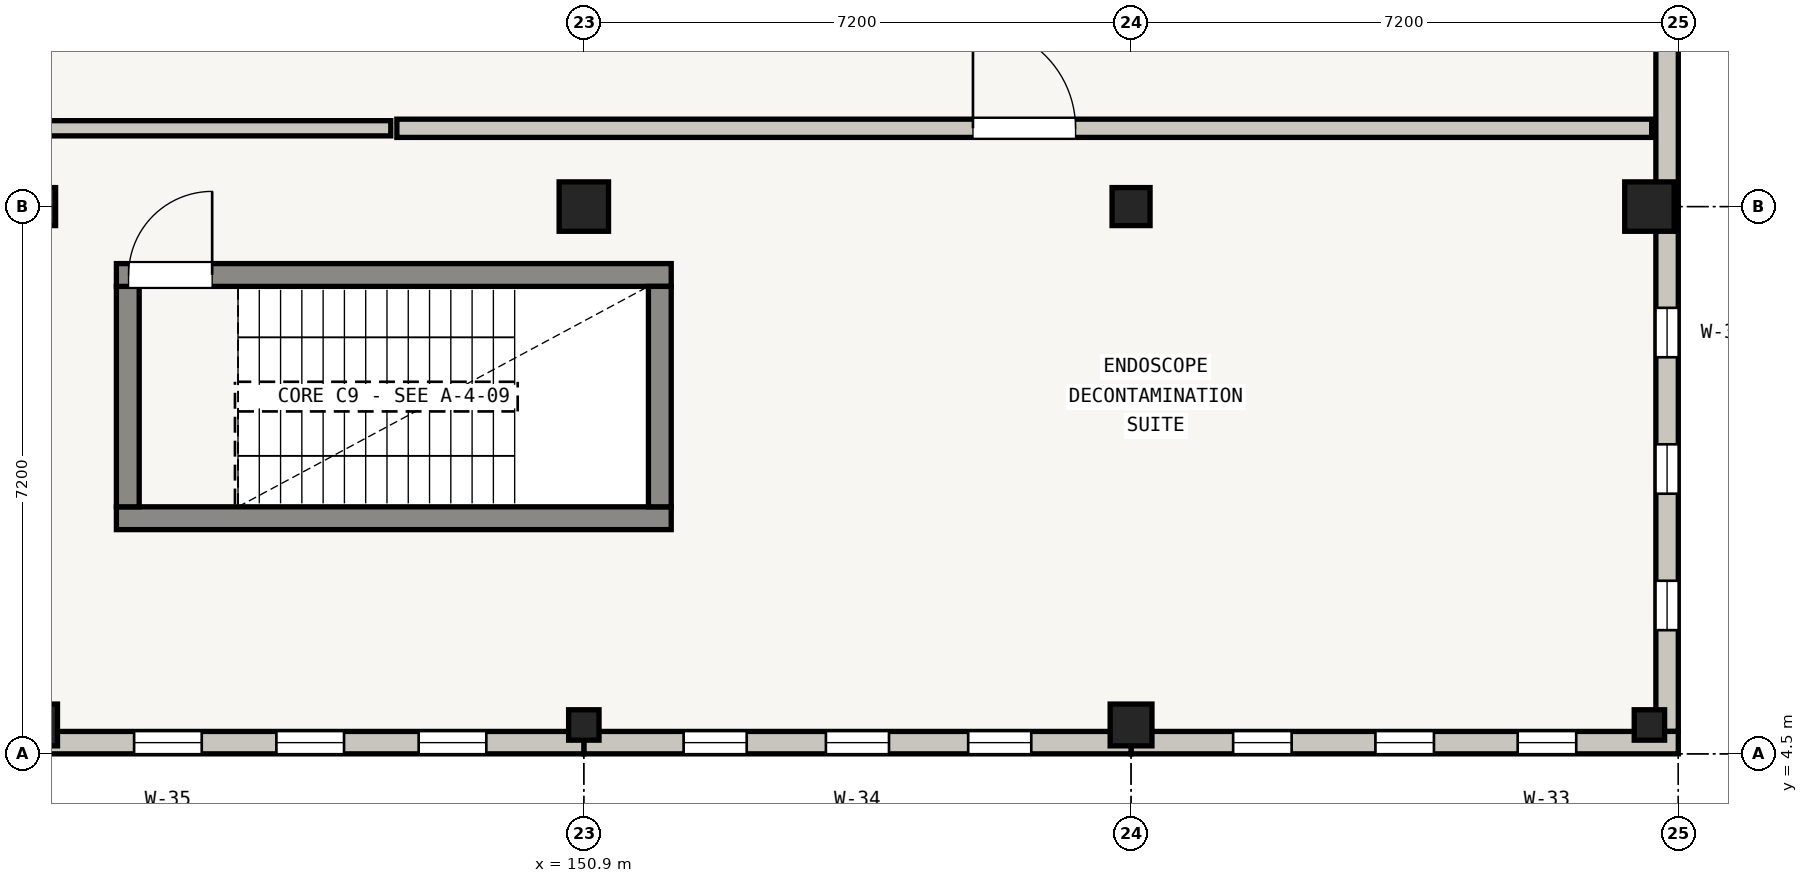
"""IFC4 building model, lengths in metres.
Left out: names, types, materials, properties, quantities, classifications, styles, units other than length and angle.
Written with IfcOpenShell. Run it as: python <this file> out.ifc"""

import sys

from ifc_helpers import new_model, si_unit, direction, frame, frame_2d, origin, origin_2d, place, context, subcontext, project, spatial, rectangle, extrude, element, fill, save


model = new_model("IFC4")
c1 = context("Model", 3, precision=1e-05, world=origin(), true_north=direction((0.0, 1.0)))
c2 = subcontext(c1, "Body", "Model", "MODEL_VIEW")
j1 = project(units=[si_unit("LENGTHUNIT", "METRE"), si_unit("PLANEANGLEUNIT", "RADIAN")], contexts=[c1])
p1 = place(None, origin())
s1 = spatial("IfcSite", under=j1, at=p1, CompositionType="ELEMENT")
p2 = place(p1, origin())
s2 = spatial("IfcBuilding", under=s1, at=p2, CompositionType="ELEMENT")
p3 = place(p2, frame((0.0, 0.0, 4.5)))
s3 = spatial("IfcBuildingStorey", under=s2, at=p3, CompositionType="ELEMENT", Elevation=4.5)
p4 = place(p3, frame((143.7, 4.88, 0.0), z_axis=(0.0, 0.0, 1.0), x_axis=(1.0, 0.0, 0.0)))
e1 = element("IfcColumn", 1, at=p4, inside=s3, PredefinedType="COLUMN", context=c2, shape_type="SweptSolid", body=[
    extrude(rectangle(XDim=0.55, YDim=0.55, at=origin_2d()), origin(), (0.0, 0.0, 1.0), 3.905),
])
p5 = place(p3, frame((143.7, 11.7, 0.0), z_axis=(0.0, 0.0, 1.0), x_axis=(1.0, 0.0, 0.0)))
e2 = element("IfcColumn", 2, at=p5, inside=s3, PredefinedType="COLUMN", context=c2, shape_type="SweptSolid", body=[
    extrude(rectangle(XDim=0.5, YDim=0.5, at=origin_2d()), origin(), (0.0, 0.0, 1.0), 3.905),
])
p6 = place(p3, frame((150.9, 4.88, 0.0), z_axis=(0.0, 0.0, 1.0), x_axis=(1.0, 0.0, 0.0)))
e3 = element("IfcColumn", 3, at=p6, inside=s3, PredefinedType="COLUMN", context=c2, shape_type="SweptSolid", body=[
    extrude(rectangle(XDim=0.4, YDim=0.4, at=origin_2d()), origin(), (0.0, 0.0, 1.0), 3.905),
])
p7 = place(p3, frame((150.9, 11.7, 0.0), z_axis=(0.0, 0.0, 1.0), x_axis=(1.0, 0.0, 0.0)))
e4 = element("IfcColumn", 4, at=p7, inside=s3, PredefinedType="COLUMN", context=c2, shape_type="SweptSolid", body=[
    extrude(rectangle(XDim=0.65, YDim=0.65, at=origin_2d()), origin(), (0.0, 0.0, 1.0), 3.905),
])
p8 = place(p3, frame((158.1, 4.88, 0.0), z_axis=(0.0, 0.0, 1.0), x_axis=(1.0, 0.0, 0.0)))
e5 = element("IfcColumn", 5, at=p8, inside=s3, PredefinedType="COLUMN", context=c2, shape_type="SweptSolid", body=[
    extrude(rectangle(XDim=0.55, YDim=0.55, at=origin_2d()), origin(), (0.0, 0.0, 1.0), 3.905),
])
p9 = place(p3, frame((158.1, 11.7, 0.0), z_axis=(0.0, 0.0, 1.0), x_axis=(1.0, 0.0, 0.0)))
e6 = element("IfcColumn", 6, at=p9, inside=s3, PredefinedType="COLUMN", context=c2, shape_type="SweptSolid", body=[
    extrude(rectangle(XDim=0.5, YDim=0.5, at=origin_2d()), origin(), (0.0, 0.0, 1.0), 3.905),
])
p10 = place(p3, frame((164.92, 4.88, 0.0), z_axis=(0.0, 0.0, 1.0), x_axis=(1.0, 0.0, 0.0)))
e7 = element("IfcColumn", 7, at=p10, inside=s3, PredefinedType="COLUMN", context=c2, shape_type="SweptSolid", body=[
    extrude(rectangle(XDim=0.4, YDim=0.4, at=origin_2d()), origin(), (0.0, 0.0, 1.0), 3.905),
])
p11 = place(p3, frame((164.92, 11.7, 0.0), z_axis=(0.0, 0.0, 1.0), x_axis=(1.0, 0.0, 0.0)))
e8 = element("IfcColumn", 8, at=p11, inside=s3, PredefinedType="COLUMN", context=c2, shape_type="SweptSolid", body=[
    extrude(rectangle(XDim=0.65, YDim=0.65, at=origin_2d()), origin(), (0.0, 0.0, 1.0), 3.905),
])
p12 = place(p3, frame((165.153, 18.605, 0.0), z_axis=(0.0, 0.0, 1.0), x_axis=(0.0, -1.0, 0.0)))
e9 = element("IfcWall", 9, at=p12, inside=s3, PredefinedType="STANDARD", context=c2, shape_type="SweptSolid", body=[
    extrude(rectangle(XDim=6.905, YDim=0.295, at=frame_2d((3.453, 0.0))), origin(), (0.0, 0.0, 1.0), 3.27),
])
p13 = place(p12, frame((1.257, 0.0, 0.55)))
e10 = element("IfcOpeningElement", 10, at=p13, cuts=e9, PredefinedType="OPENING", context=c2, shape_type="SweptSolid", body=[
    extrude(rectangle(XDim=0.8, YDim=2.04, at=frame_2d((0.4, 1.02))), frame((0.0, 0.147, 0.0), z_axis=(0.0, -1.0, 0.0), x_axis=(1.0, 0.0, 0.0)), (0.0, 0.0, 1.0), 0.295),
])
p14 = place(p12, frame((3.948, 0.0, 0.55)))
e11 = element("IfcOpeningElement", 11, at=p14, cuts=e9, PredefinedType="OPENING", context=c2, shape_type="SweptSolid", body=[
    extrude(rectangle(XDim=0.8, YDim=2.04, at=frame_2d((0.4, 1.02))), frame((0.0, 0.147, 0.0), z_axis=(0.0, -1.0, 0.0), x_axis=(1.0, 0.0, 0.0)), (0.0, 0.0, 1.0), 0.295),
])
p15 = place(p3, frame((165.153, 11.7, 0.0), z_axis=(0.0, 0.0, 1.0), x_axis=(0.0, -1.0, 0.0)))
e12 = element("IfcWall", 12, at=p15, inside=s3, PredefinedType="STANDARD", context=c2, shape_type="SweptSolid", body=[
    extrude(rectangle(XDim=6.905, YDim=0.295, at=frame_2d((3.453, 0.0))), origin(), (0.0, 0.0, 1.0), 3.27),
])
p16 = place(p15, frame((1.332, 0.0, 0.55)))
e13 = element("IfcOpeningElement", 13, at=p16, cuts=e12, PredefinedType="OPENING", context=c2, shape_type="SweptSolid", body=[
    extrude(rectangle(XDim=0.65, YDim=2.14, at=frame_2d((0.325, 1.07))), frame((0.0, 0.147, 0.0), z_axis=(0.0, -1.0, 0.0), x_axis=(1.0, 0.0, 0.0)), (0.0, 0.0, 1.0), 0.295),
])
p17 = place(p15, frame((3.127, 0.0, 0.55)))
e14 = element("IfcOpeningElement", 14, at=p17, cuts=e12, PredefinedType="OPENING", context=c2, shape_type="SweptSolid", body=[
    extrude(rectangle(XDim=0.65, YDim=2.14, at=frame_2d((0.325, 1.07))), frame((0.0, 0.147, 0.0), z_axis=(0.0, -1.0, 0.0), x_axis=(1.0, 0.0, 0.0)), (0.0, 0.0, 1.0), 0.295),
])
p18 = place(p15, frame((4.923, 0.0, 0.55)))
e15 = element("IfcOpeningElement", 15, at=p18, cuts=e12, PredefinedType="OPENING", context=c2, shape_type="SweptSolid", body=[
    extrude(rectangle(XDim=0.65, YDim=2.14, at=frame_2d((0.325, 1.07))), frame((0.0, 0.147, 0.0), z_axis=(0.0, -1.0, 0.0), x_axis=(1.0, 0.0, 0.0)), (0.0, 0.0, 1.0), 0.295),
])
p19 = place(p3, frame((165.3, 4.647, 0.0), z_axis=(0.0, 0.0, 1.0), x_axis=(-1.0, 0.0, 0.0)))
e16 = element("IfcWall", 16, at=p19, inside=s3, PredefinedType="STANDARD", context=c2, shape_type="SweptSolid", body=[
    extrude(rectangle(XDim=7.2, YDim=0.295, at=frame_2d((3.6, 0.0))), origin(), (0.0, 0.0, 1.0), 2.94),
])
p20 = place(p19, frame((1.343, 0.0, 0.55)))
e17 = element("IfcOpeningElement", 17, at=p20, cuts=e16, PredefinedType="OPENING", context=c2, shape_type="SweptSolid", body=[
    extrude(rectangle(XDim=0.77, YDim=2.06, at=frame_2d((0.385, 1.03))), frame((0.0, 0.147, 0.0), z_axis=(0.0, -1.0, 0.0), x_axis=(1.0, 0.0, 0.0)), (0.0, 0.0, 1.0), 0.295),
])
p21 = place(p19, frame((3.215, 0.0, 0.55)))
e18 = element("IfcOpeningElement", 18, at=p21, cuts=e16, PredefinedType="OPENING", context=c2, shape_type="SweptSolid", body=[
    extrude(rectangle(XDim=0.77, YDim=2.06, at=frame_2d((0.385, 1.03))), frame((0.0, 0.147, 0.0), z_axis=(0.0, -1.0, 0.0), x_axis=(1.0, 0.0, 0.0)), (0.0, 0.0, 1.0), 0.295),
])
p22 = place(p19, frame((5.087, 0.0, 0.55)))
e19 = element("IfcOpeningElement", 19, at=p22, cuts=e16, PredefinedType="OPENING", context=c2, shape_type="SweptSolid", body=[
    extrude(rectangle(XDim=0.77, YDim=2.06, at=frame_2d((0.385, 1.03))), frame((0.0, 0.147, 0.0), z_axis=(0.0, -1.0, 0.0), x_axis=(1.0, 0.0, 0.0)), (0.0, 0.0, 1.0), 0.295),
])
p23 = place(p3, frame((158.1, 4.647, 0.0), z_axis=(0.0, 0.0, 1.0), x_axis=(-1.0, 0.0, 0.0)))
e20 = element("IfcWall", 20, at=p23, inside=s3, PredefinedType="STANDARD", context=c2, shape_type="SweptSolid", body=[
    extrude(rectangle(XDim=7.2, YDim=0.295, at=frame_2d((3.6, 0.0))), origin(), (0.0, 0.0, 1.0), 2.94),
])
p24 = place(p23, frame((1.313, 0.0, 0.55)))
e21 = element("IfcOpeningElement", 21, at=p24, cuts=e20, PredefinedType="OPENING", context=c2, shape_type="SweptSolid", body=[
    extrude(rectangle(XDim=0.83, YDim=2.06, at=frame_2d((0.415, 1.03))), frame((0.0, 0.147, 0.0), z_axis=(0.0, -1.0, 0.0), x_axis=(1.0, 0.0, 0.0)), (0.0, 0.0, 1.0), 0.295),
])
p25 = place(p23, frame((3.185, 0.0, 0.55)))
e22 = element("IfcOpeningElement", 22, at=p25, cuts=e20, PredefinedType="OPENING", context=c2, shape_type="SweptSolid", body=[
    extrude(rectangle(XDim=0.83, YDim=2.06, at=frame_2d((0.415, 1.03))), frame((0.0, 0.147, 0.0), z_axis=(0.0, -1.0, 0.0), x_axis=(1.0, 0.0, 0.0)), (0.0, 0.0, 1.0), 0.295),
])
p26 = place(p23, frame((5.057, 0.0, 0.55)))
e23 = element("IfcOpeningElement", 23, at=p26, cuts=e20, PredefinedType="OPENING", context=c2, shape_type="SweptSolid", body=[
    extrude(rectangle(XDim=0.83, YDim=2.06, at=frame_2d((0.415, 1.03))), frame((0.0, 0.147, 0.0), z_axis=(0.0, -1.0, 0.0), x_axis=(1.0, 0.0, 0.0)), (0.0, 0.0, 1.0), 0.295),
])
p27 = place(p3, frame((150.9, 4.647, 0.0), z_axis=(0.0, 0.0, 1.0), x_axis=(-1.0, 0.0, 0.0)))
e24 = element("IfcWall", 24, at=p27, inside=s3, PredefinedType="STANDARD", context=c2, shape_type="SweptSolid", body=[
    extrude(rectangle(XDim=7.2, YDim=0.295, at=frame_2d((3.6, 0.0))), origin(), (0.0, 0.0, 1.0), 3.27),
])
p28 = place(p27, frame((1.283, 0.0, 0.55)))
e25 = element("IfcOpeningElement", 25, at=p28, cuts=e24, PredefinedType="OPENING", context=c2, shape_type="SweptSolid", body=[
    extrude(rectangle(XDim=0.89, YDim=2.02, at=frame_2d((0.445, 1.01))), frame((0.0, 0.147, 0.0), z_axis=(0.0, -1.0, 0.0), x_axis=(1.0, 0.0, 0.0)), (0.0, 0.0, 1.0), 0.295),
])
p29 = place(p27, frame((3.155, 0.0, 0.55)))
e26 = element("IfcOpeningElement", 26, at=p29, cuts=e24, PredefinedType="OPENING", context=c2, shape_type="SweptSolid", body=[
    extrude(rectangle(XDim=0.89, YDim=2.02, at=frame_2d((0.445, 1.01))), frame((0.0, 0.147, 0.0), z_axis=(0.0, -1.0, 0.0), x_axis=(1.0, 0.0, 0.0)), (0.0, 0.0, 1.0), 0.295),
])
p30 = place(p27, frame((5.027, 0.0, 0.55)))
e27 = element("IfcOpeningElement", 27, at=p30, cuts=e24, PredefinedType="OPENING", context=c2, shape_type="SweptSolid", body=[
    extrude(rectangle(XDim=0.89, YDim=2.02, at=frame_2d((0.445, 1.01))), frame((0.0, 0.147, 0.0), z_axis=(0.0, -1.0, 0.0), x_axis=(1.0, 0.0, 0.0)), (0.0, 0.0, 1.0), 0.295),
])
p31 = place(p3, frame((152.05, 7.6, 0.0), z_axis=(0.0, 0.0, 1.0), x_axis=(-1.0, 0.0, 0.0)))
e28 = element("IfcWall", 28, at=p31, inside=s3, PredefinedType="SHEAR", context=c2, shape_type="SweptSolid", body=[
    extrude(rectangle(XDim=7.3, YDim=0.3, at=frame_2d((3.65, 0.0))), origin(), (0.0, 0.0, 1.0), 3.905),
])
p32 = place(p3, frame((144.9, 7.75, 0.0), z_axis=(0.0, 0.0, 1.0), x_axis=(0.0, 1.0, 0.0)))
e29 = element("IfcWall", 29, at=p32, inside=s3, PredefinedType="SHEAR", context=c2, shape_type="SweptSolid", body=[
    extrude(rectangle(XDim=2.9, YDim=0.3, at=frame_2d((1.45, 0.0))), origin(), (0.0, 0.0, 1.0), 3.905),
])
p33 = place(p3, frame((144.75, 10.8, 0.0), z_axis=(0.0, 0.0, 1.0), x_axis=(1.0, 0.0, 0.0)))
e30 = element("IfcWall", 30, at=p33, inside=s3, PredefinedType="SHEAR", context=c2, shape_type="SweptSolid", body=[
    extrude(rectangle(XDim=7.3, YDim=0.3, at=frame_2d((3.65, 0.0))), origin(), (0.0, 0.0, 1.0), 3.905),
])
p34 = place(p33, frame((0.16, 0.0, 0.0)))
e31 = element("IfcOpeningElement", 31, at=p34, cuts=e30, PredefinedType="OPENING", context=c2, shape_type="SweptSolid", body=[
    extrude(rectangle(XDim=1.1, YDim=2.05, at=frame_2d((0.55, 1.025))), frame((0.0, 0.15, 0.0), z_axis=(0.0, -1.0, 0.0), x_axis=(1.0, 0.0, 0.0)), (0.0, 0.0, 1.0), 0.3),
])
p35 = place(p3, frame((151.9, 10.65, 0.0), z_axis=(0.0, 0.0, 1.0), x_axis=(0.0, -1.0, 0.0)))
e32 = element("IfcWall", 32, at=p35, inside=s3, PredefinedType="SHEAR", context=c2, shape_type="SweptSolid", body=[
    extrude(rectangle(XDim=2.9, YDim=0.3, at=frame_2d((1.45, 0.0))), origin(), (0.0, 0.0, 1.0), 3.905),
])
p36 = place(p3, frame((124.24, 12.73, 0.0), z_axis=(0.0, 0.0, 1.0), x_axis=(1.0, 0.0, 0.0)))
e33 = element("IfcWall", 33, at=p36, inside=s3, PredefinedType="SOLIDWALL", context=c2, shape_type="SweptSolid", body=[
    extrude(rectangle(XDim=24.12, YDim=0.2, at=frame_2d((12.06, 0.0))), origin(), (0.0, 0.0, 1.0), 2.925),
])
p37 = place(p36, frame((8.022, 0.0, 0.0)))
e34 = element("IfcOpeningElement", 34, at=p37, cuts=e33, PredefinedType="OPENING", context=c2, shape_type="SweptSolid", body=[
    extrude(rectangle(XDim=1.2, YDim=2.05, at=frame_2d((0.6, 1.025))), frame((0.0, 0.1, 0.0), z_axis=(0.0, -1.0, 0.0), x_axis=(1.0, 0.0, 0.0)), (0.0, 0.0, 1.0), 0.2),
])
p38 = place(p3, frame((148.44, 12.73, 0.0), z_axis=(0.0, 0.0, 1.0), x_axis=(1.0, 0.0, 0.0)))
e35 = element("IfcWall", 35, at=p38, inside=s3, PredefinedType="SOLIDWALL", context=c2, shape_type="SweptSolid", body=[
    extrude(rectangle(XDim=16.51, YDim=0.24, at=frame_2d((8.255, 0.0))), origin(), (0.0, 0.0, 1.0), 2.925),
])
p39 = place(p38, frame((7.58, 0.0, 0.0)))
e36 = element("IfcOpeningElement", 36, at=p39, cuts=e35, PredefinedType="OPENING", context=c2, shape_type="SweptSolid", body=[
    extrude(rectangle(XDim=1.35, YDim=2.1, at=frame_2d((0.675, 1.05))), frame((0.0, 0.12, 0.0), z_axis=(0.0, -1.0, 0.0), x_axis=(1.0, 0.0, 0.0)), (0.0, 0.0, 1.0), 0.24),
])
p40 = place(p16, origin())
e37 = element("IfcWindow", 37, at=p40, inside=s3, PartitioningType="SINGLE_PANEL", PredefinedType="WINDOW", context=c2, shape_type="SweptSolid", body=[
    extrude(rectangle(XDim=0.65, YDim=2.14, at=frame_2d((0.325, 1.07))), frame((0.0, 0.03, 0.0), z_axis=(0.0, -1.0, 0.0), x_axis=(1.0, 0.0, 0.0)), (0.0, 0.0, 1.0), 0.06),
])
fill(e13, e37)
p41 = place(p17, origin())
e38 = element("IfcWindow", 38, at=p41, inside=s3, PartitioningType="SINGLE_PANEL", PredefinedType="WINDOW", context=c2, shape_type="SweptSolid", body=[
    extrude(rectangle(XDim=0.65, YDim=2.14, at=frame_2d((0.325, 1.07))), frame((0.0, 0.03, 0.0), z_axis=(0.0, -1.0, 0.0), x_axis=(1.0, 0.0, 0.0)), (0.0, 0.0, 1.0), 0.06),
])
fill(e14, e38)
p42 = place(p18, origin())
e39 = element("IfcWindow", 39, at=p42, inside=s3, PartitioningType="SINGLE_PANEL", PredefinedType="WINDOW", context=c2, shape_type="SweptSolid", body=[
    extrude(rectangle(XDim=0.65, YDim=2.14, at=frame_2d((0.325, 1.07))), frame((0.0, 0.03, 0.0), z_axis=(0.0, -1.0, 0.0), x_axis=(1.0, 0.0, 0.0)), (0.0, 0.0, 1.0), 0.06),
])
fill(e15, e39)
p43 = place(p20, origin())
e40 = element("IfcWindow", 40, at=p43, inside=s3, PartitioningType="SINGLE_PANEL", PredefinedType="WINDOW", context=c2, shape_type="SweptSolid", body=[
    extrude(rectangle(XDim=0.77, YDim=2.06, at=frame_2d((0.385, 1.03))), frame((0.0, 0.03, 0.0), z_axis=(0.0, -1.0, 0.0), x_axis=(1.0, 0.0, 0.0)), (0.0, 0.0, 1.0), 0.06),
])
fill(e17, e40)
p44 = place(p21, origin())
e41 = element("IfcWindow", 41, at=p44, inside=s3, PartitioningType="SINGLE_PANEL", PredefinedType="WINDOW", context=c2, shape_type="SweptSolid", body=[
    extrude(rectangle(XDim=0.77, YDim=2.06, at=frame_2d((0.385, 1.03))), frame((0.0, 0.03, 0.0), z_axis=(0.0, -1.0, 0.0), x_axis=(1.0, 0.0, 0.0)), (0.0, 0.0, 1.0), 0.06),
])
fill(e18, e41)
p45 = place(p22, origin())
e42 = element("IfcWindow", 42, at=p45, inside=s3, PartitioningType="SINGLE_PANEL", PredefinedType="WINDOW", context=c2, shape_type="SweptSolid", body=[
    extrude(rectangle(XDim=0.77, YDim=2.06, at=frame_2d((0.385, 1.03))), frame((0.0, 0.03, 0.0), z_axis=(0.0, -1.0, 0.0), x_axis=(1.0, 0.0, 0.0)), (0.0, 0.0, 1.0), 0.06),
])
fill(e19, e42)
p46 = place(p24, origin())
e43 = element("IfcWindow", 43, at=p46, inside=s3, PartitioningType="SINGLE_PANEL", PredefinedType="WINDOW", context=c2, shape_type="SweptSolid", body=[
    extrude(rectangle(XDim=0.83, YDim=2.06, at=frame_2d((0.415, 1.03))), frame((0.0, 0.03, 0.0), z_axis=(0.0, -1.0, 0.0), x_axis=(1.0, 0.0, 0.0)), (0.0, 0.0, 1.0), 0.06),
])
fill(e21, e43)
p47 = place(p25, origin())
e44 = element("IfcWindow", 44, at=p47, inside=s3, PartitioningType="SINGLE_PANEL", PredefinedType="WINDOW", context=c2, shape_type="SweptSolid", body=[
    extrude(rectangle(XDim=0.83, YDim=2.06, at=frame_2d((0.415, 1.03))), frame((0.0, 0.03, 0.0), z_axis=(0.0, -1.0, 0.0), x_axis=(1.0, 0.0, 0.0)), (0.0, 0.0, 1.0), 0.06),
])
fill(e22, e44)
p48 = place(p26, origin())
e45 = element("IfcWindow", 45, at=p48, inside=s3, PartitioningType="SINGLE_PANEL", PredefinedType="WINDOW", context=c2, shape_type="SweptSolid", body=[
    extrude(rectangle(XDim=0.83, YDim=2.06, at=frame_2d((0.415, 1.03))), frame((0.0, 0.03, 0.0), z_axis=(0.0, -1.0, 0.0), x_axis=(1.0, 0.0, 0.0)), (0.0, 0.0, 1.0), 0.06),
])
fill(e23, e45)
p49 = place(p28, origin())
e46 = element("IfcWindow", 46, at=p49, inside=s3, PartitioningType="DOUBLE_PANEL_VERTICAL", PredefinedType="WINDOW", context=c2, shape_type="SweptSolid", body=[
    extrude(rectangle(XDim=0.89, YDim=2.02, at=frame_2d((0.445, 1.01))), frame((0.0, 0.03, 0.0), z_axis=(0.0, -1.0, 0.0), x_axis=(1.0, 0.0, 0.0)), (0.0, 0.0, 1.0), 0.06),
])
fill(e25, e46)
p50 = place(p29, origin())
e47 = element("IfcWindow", 47, at=p50, inside=s3, PartitioningType="DOUBLE_PANEL_VERTICAL", PredefinedType="WINDOW", context=c2, shape_type="SweptSolid", body=[
    extrude(rectangle(XDim=0.89, YDim=2.02, at=frame_2d((0.445, 1.01))), frame((0.0, 0.03, 0.0), z_axis=(0.0, -1.0, 0.0), x_axis=(1.0, 0.0, 0.0)), (0.0, 0.0, 1.0), 0.06),
])
fill(e26, e47)
p51 = place(p30, origin())
e48 = element("IfcWindow", 48, at=p51, inside=s3, PartitioningType="DOUBLE_PANEL_VERTICAL", PredefinedType="WINDOW", context=c2, shape_type="SweptSolid", body=[
    extrude(rectangle(XDim=0.89, YDim=2.02, at=frame_2d((0.445, 1.01))), frame((0.0, 0.03, 0.0), z_axis=(0.0, -1.0, 0.0), x_axis=(1.0, 0.0, 0.0)), (0.0, 0.0, 1.0), 0.06),
])
fill(e27, e48)
p52 = place(p34, origin())
e49 = element("IfcDoor", 49, at=p52, inside=s3, OperationType="SINGLE_SWING_RIGHT", PredefinedType="DOOR", context=c2, shape_type="SweptSolid", body=[
    extrude(rectangle(XDim=1.1, YDim=2.05, at=frame_2d((0.55, 1.025))), frame((0.0, 0.025, 0.0), z_axis=(0.0, -1.0, 0.0), x_axis=(1.0, 0.0, 0.0)), (0.0, 0.0, 1.0), 0.05),
])
fill(e31, e49)
p53 = place(p39, origin())
e50 = element("IfcDoor", 50, at=p53, inside=s3, OperationType="SINGLE_SWING_LEFT", PredefinedType="DOOR", context=c2, shape_type="SweptSolid", body=[
    extrude(rectangle(XDim=1.35, YDim=2.1, at=frame_2d((0.675, 1.05))), frame((0.0, 0.025, 0.0), z_axis=(0.0, -1.0, 0.0), x_axis=(1.0, 0.0, 0.0)), (0.0, 0.0, 1.0), 0.05),
])
fill(e36, e50)
save(model, sys.argv[1])
